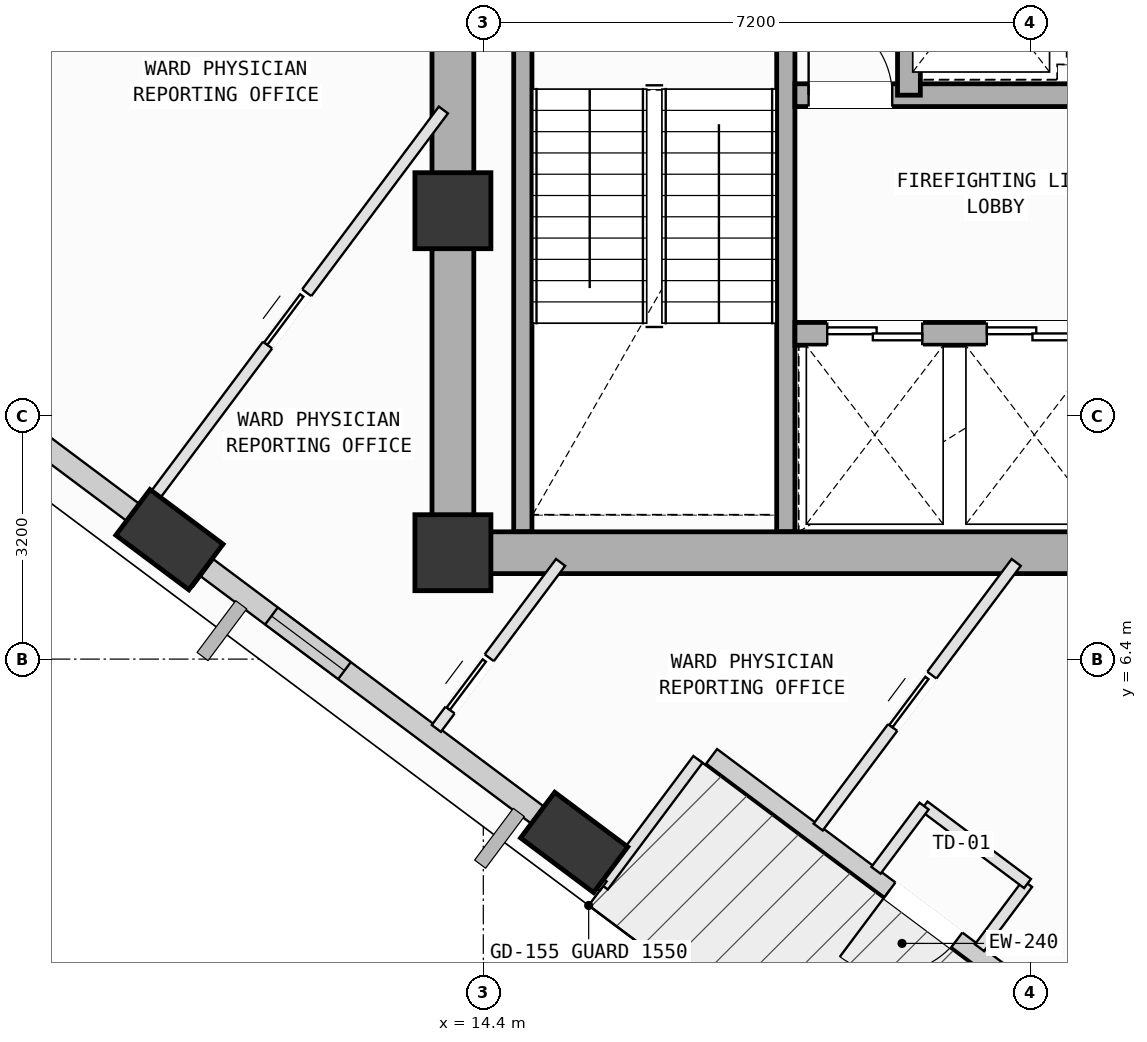
"""IFC4 building model, lengths in metres.
Left out: names, types, materials, properties, quantities, classifications, styles, units other than length and angle.
Written with IfcOpenShell. Run it as: python <this file> out.ifc"""

import sys

from ifc_helpers import new_model, si_unit, direction, frame, frame_2d, origin, origin_2d, place, context, subcontext, project, spatial, rectangle, extrude, element, fill, save


model = new_model("IFC4")
c1 = context("Model", 3, precision=1e-05, world=origin(), true_north=direction((0.0, 1.0)))
c2 = subcontext(c1, "Body", "Model", "MODEL_VIEW")
j1 = project(units=[si_unit("LENGTHUNIT", "METRE"), si_unit("PLANEANGLEUNIT", "RADIAN")], contexts=[c1])
p1 = place(None, origin())
s1 = spatial("IfcSite", under=j1, at=p1, CompositionType="ELEMENT")
p2 = place(p1, origin())
s2 = spatial("IfcBuilding", under=s1, at=p2, CompositionType="ELEMENT")
p3 = place(p2, frame((0.0, 0.0, 251.2)))
s3 = spatial("IfcBuildingStorey", under=s2, at=p3, CompositionType="ELEMENT", Elevation=251.2)
for number, where, z_axis, x_axis in (
    (1, (14.0, 7.8, 0.0), (0.0, 0.0, 1.0), (1.0, 0.0, 0.0)),
    (2, (14.0, 12.3, 0.0), (0.0, 0.0, 1.0), (1.0, 0.0, 0.0)),
):
    element("IfcColumn", number, at=place(p3, frame(where, z_axis=z_axis, x_axis=x_axis)), inside=s3, PredefinedType="COLUMN", context=c2, shape_type="SweptSolid", body=[
        extrude(rectangle(XDim=1.0, YDim=1.0, at=origin_2d()), origin(), (0.0, 0.0, 1.0), 4.0),
    ])
p4 = place(p3, frame((10.271, 7.971, 0.002), z_axis=(0.070003274171, -0.09548106893, 0.992966720027), x_axis=(-0.997462411054, 0.006244621078, 0.07092068275)))
e3 = element("IfcColumn", 3, at=p4, inside=s3, PredefinedType="COLUMN", context=c2, shape_type="SweptSolid", body=[
    extrude(rectangle(XDim=1.2, YDim=0.75, at=origin_2d()), origin(), (0.0, 0.0, 1.0), 4.025),
])
p5 = place(p3, frame((15.595, 3.988, 0.002), z_axis=(0.086372089223, -0.073443589571, 0.993552163379), x_axis=(-0.972110341337, -0.224475070802, 0.067914850025)))
e4 = element("IfcColumn", 4, at=p5, inside=s3, PredefinedType="COLUMN", context=c2, shape_type="SweptSolid", body=[
    extrude(rectangle(XDim=1.2, YDim=0.75, at=origin_2d()), origin(), (0.0, 0.0, 1.0), 4.022),
])
p6 = place(p3, frame((22.977, 0.951, 0.0), z_axis=(0.0, 0.0, 1.0), x_axis=(-0.800727631984, 0.59902859646, 0.0)))
e5 = element("IfcWall", 5, at=p6, inside=s3, PredefinedType="SOLIDWALL", context=c2, shape_type="SweptSolid", body=[
    extrude(rectangle(XDim=6.96, YDim=0.24, at=frame_2d((3.48, 0.0))), origin(), (0.0, 0.0, 1.0), 3.265),
])
p7 = place(p6, frame((2.93, 0.0, 0.0)))
e6 = element("IfcOpeningElement", 6, at=p7, cuts=e5, PredefinedType="OPENING", context=c2, shape_type="SweptSolid", body=[
    extrude(rectangle(XDim=1.1, YDim=2.15, at=frame_2d((0.55, 1.075))), frame((0.0, 0.13, 0.0), z_axis=(0.0, -1.0, 0.0), x_axis=(1.0, 0.0, 0.0)), (0.0, 0.0, 1.0), 0.26),
])
p8 = place(p3, frame((10.14, 8.069, 0.0), z_axis=(0.0, 0.0, 1.0), x_axis=(-0.800727991846, 0.599028115429, 0.0)))
e7 = element("IfcWall", 7, at=p8, inside=s3, PredefinedType="SOLIDWALL", context=c2, shape_type="SweptSolid", body=[
    extrude(rectangle(XDim=5.831, YDim=0.28, at=frame_2d((2.915, 0.0))), origin(), (0.0, 0.0, 1.0), 3.265),
])
p9 = place(p8, frame((1.917, 0.0, 0.75)))
e8 = element("IfcOpeningElement", 8, at=p9, cuts=e7, PredefinedType="OPENING", context=c2, shape_type="SweptSolid", body=[
    extrude(rectangle(XDim=1.8, YDim=2.05, at=frame_2d((0.9, 1.025))), frame((0.0, 0.15, 0.0), z_axis=(0.0, -1.0, 0.0), x_axis=(1.0, 0.0, 0.0)), (0.0, 0.0, 1.0), 0.3),
])
p10 = place(p3, frame((15.46, 4.09, 0.0), z_axis=(0.0, 0.0, 1.0), x_axis=(-0.800744184448, 0.599006469976, 0.0)))
e9 = element("IfcWall", 9, at=p10, inside=s3, PredefinedType="SOLIDWALL", context=c2, shape_type="SweptSolid", body=[
    extrude(rectangle(XDim=5.861, YDim=0.28, at=frame_2d((2.93, 0.0))), origin(), (0.0, 0.0, 1.0), 3.245),
])
p11 = place(p10, frame((3.604, 0.0, 0.75)))
e10 = element("IfcOpeningElement", 10, at=p11, cuts=e9, PredefinedType="OPENING", context=c2, shape_type="SweptSolid", body=[
    extrude(rectangle(XDim=1.2, YDim=1.75, at=frame_2d((0.6, 0.875))), frame((0.0, 0.15, 0.0), z_axis=(0.0, -1.0, 0.0), x_axis=(1.0, 0.0, 0.0)), (0.0, 0.0, 1.0), 0.3),
])
for number, where, z_axis, x_axis in (
    (11, (18.38, 15.12, 0.0), (0.0, 0.0, 1.0), (0.0, -1.0, 0.0)),
    (12, (14.92, 8.075, 0.0), (0.0, 0.0, 1.0), (0.0, 1.0, 0.0)),
):
    element("IfcWall", number, at=place(p3, frame(where, z_axis=z_axis, x_axis=x_axis)), inside=s3, PredefinedType="SOLIDWALL", context=c2, shape_type="SweptSolid", body=[
        extrude(rectangle(XDim=7.045, YDim=0.24, at=frame_2d((3.522, 0.0))), origin(), (0.0, 0.0, 1.0), 3.78),
    ])
p12 = place(p3, frame((14.0, 7.8, 0.0), z_axis=(0.0, 0.0, 1.0), x_axis=(1.0, 0.0, 0.0)))
e13 = element("IfcWall", 13, at=p12, inside=s3, PredefinedType="SHEAR", context=c2, shape_type="SweptSolid", body=[
    extrude(rectangle(XDim=10.8, YDim=0.55, at=frame_2d((5.4, 0.0))), origin(), (0.0, 0.0, 1.0), 3.78),
])
p13 = place(p3, frame((14.0, 16.8, 0.0), z_axis=(0.0, 0.0, 1.0), x_axis=(0.0, -1.0, 0.0)))
e14 = element("IfcWall", 14, at=p13, inside=s3, PredefinedType="SHEAR", context=c2, shape_type="SweptSolid", body=[
    extrude(rectangle(XDim=9.0, YDim=0.55, at=frame_2d((4.5, 0.0))), origin(), (0.0, 0.0, 1.0), 3.78),
])
p14 = place(p3, frame((18.5, 10.68, 0.0), z_axis=(0.0, 0.0, 1.0), x_axis=(1.0, 0.0, 0.0)))
e15 = element("IfcWall", 15, at=p14, inside=s3, PredefinedType="SOLIDWALL", context=c2, shape_type="SweptSolid", body=[
    extrude(rectangle(XDim=5.3, YDim=0.3, at=frame_2d((2.65, 0.0))), origin(), (0.0, 0.0, 1.0), 3.78),
])
p15 = place(p14, frame((4.22, 0.0, 0.0)))
e16 = element("IfcOpeningElement", 16, at=p15, cuts=e15, PredefinedType="OPENING", context=c2, shape_type="SweptSolid", body=[
    extrude(rectangle(XDim=0.86, YDim=2.06, at=frame_2d((0.43, 1.03))), frame((0.0, 0.16, 0.0), z_axis=(0.0, -1.0, 0.0), x_axis=(1.0, 0.0, 0.0)), (0.0, 0.0, 1.0), 0.32),
])
p16 = place(p14, frame((0.425, 0.0, 0.0)))
e17 = element("IfcOpeningElement", 17, at=p16, cuts=e15, PredefinedType="OPENING", context=c2, shape_type="SweptSolid", body=[
    extrude(rectangle(XDim=1.25, YDim=2.18, at=frame_2d((0.625, 1.09))), frame((0.0, 0.16, 0.0), z_axis=(0.0, -1.0, 0.0), x_axis=(1.0, 0.0, 0.0)), (0.0, 0.0, 1.0), 0.32),
])
p17 = place(p14, frame((2.525, 0.0, 0.0)))
e18 = element("IfcOpeningElement", 18, at=p17, cuts=e15, PredefinedType="OPENING", context=c2, shape_type="SweptSolid", body=[
    extrude(rectangle(XDim=1.25, YDim=2.18, at=frame_2d((0.625, 1.09))), frame((0.0, 0.16, 0.0), z_axis=(0.0, -1.0, 0.0), x_axis=(1.0, 0.0, 0.0)), (0.0, 0.0, 1.0), 0.32),
])
p18 = place(p3, frame((18.5, 13.82, 0.0), z_axis=(0.0, 0.0, 1.0), x_axis=(1.0, 0.0, 0.0)))
e19 = element("IfcWall", 19, at=p18, inside=s3, PredefinedType="SOLIDWALL", context=c2, shape_type="SweptSolid", body=[
    extrude(rectangle(XDim=5.3, YDim=0.3, at=frame_2d((2.65, 0.0))), origin(), (0.0, 0.0, 1.0), 3.78),
])
p19 = place(p18, frame((0.18, 0.0, 0.0)))
e20 = element("IfcOpeningElement", 20, at=p19, cuts=e19, PredefinedType="OPENING", context=c2, shape_type="SweptSolid", body=[
    extrude(rectangle(XDim=1.1, YDim=2.15, at=frame_2d((0.55, 1.075))), frame((0.0, 0.16, 0.0), z_axis=(0.0, -1.0, 0.0), x_axis=(1.0, 0.0, 0.0)), (0.0, 0.0, 1.0), 0.32),
])
p20 = place(p3, frame((20.0, 13.82, 0.0), z_axis=(0.0, 0.0, 1.0), x_axis=(0.0, 1.0, 0.0)))
e21 = element("IfcWall", 21, at=p20, inside=s3, PredefinedType="SOLIDWALL", context=c2, shape_type="SweptSolid", body=[
    extrude(rectangle(XDim=2.73, YDim=0.3, at=frame_2d((1.365, 0.0))), origin(), (0.0, 0.0, 1.0), 3.78),
])
p21 = place(p3, frame((20.928, 2.603, 0.0), z_axis=(0.0, 0.0, 1.0), x_axis=(0.599444171205, 0.800416570049, 0.0)))
e22 = element("IfcWall", 22, at=p21, inside=s3, PredefinedType="PARTITIONING", context=c2, shape_type="SweptSolid", body=[
    extrude(rectangle(XDim=1.054, YDim=0.15, at=frame_2d((0.527, 0.0))), origin(), (0.0, 0.0, 1.0), 3.78),
])
p22 = place(p3, frame((21.56, 3.447, 0.0), z_axis=(0.0, 0.0, 1.0), x_axis=(-0.800499406508, 0.599333546684, 0.0)))
e23 = element("IfcWall", 23, at=p22, inside=s3, PredefinedType="PARTITIONING", context=c2, shape_type="SweptSolid", body=[
    extrude(rectangle(XDim=1.7, YDim=0.15, at=frame_2d((0.85, 0.0))), origin(), (0.0, 0.0, 1.0), 3.415),
])
p23 = place(p3, frame((20.199, 4.466, 0.0), z_axis=(0.0, 0.0, 1.0), x_axis=(-0.599000041508, -0.800748993302, 0.0)))
e24 = element("IfcWall", 24, at=p23, inside=s3, PredefinedType="PARTITIONING", context=c2, shape_type="SweptSolid", body=[
    extrude(rectangle(XDim=1.055, YDim=0.15, at=frame_2d((0.528, 0.0))), origin(), (0.0, 0.0, 1.0), 3.78),
])
p24 = place(p3, frame((18.806, 4.19, 0.0), z_axis=(0.0, 0.0, 1.0), x_axis=(0.599020458163, 0.800733720223, 0.0)))
e25 = element("IfcWall", 25, at=p24, inside=s3, PredefinedType="PARTITIONING", context=c2, shape_type="SweptSolid", body=[
    extrude(rectangle(XDim=4.349, YDim=0.15, at=frame_2d((2.174, 0.0))), origin(), (0.0, 0.0, 1.0), 3.78),
])
p25 = place(p24, frame((1.637, 0.0, 0.0)))
e26 = element("IfcOpeningElement", 26, at=p25, cuts=e25, PredefinedType="OPENING", context=c2, shape_type="SweptSolid", body=[
    extrude(rectangle(XDim=0.86, YDim=2.06, at=frame_2d((0.43, 1.03))), frame((0.0, 0.085, 0.0), z_axis=(0.0, -1.0, 0.0), x_axis=(1.0, 0.0, 0.0)), (0.0, 0.0, 1.0), 0.17),
])
p26 = place(p3, frame((17.224, 5.08, 0.0), z_axis=(0.0, 0.0, 1.0), x_axis=(-0.59894803695, -0.800787892662, 0.0)))
e27 = element("IfcWall", 27, at=p26, inside=s3, PredefinedType="PARTITIONING", context=c2, shape_type="SweptSolid", body=[
    extrude(rectangle(XDim=2.081, YDim=0.15, at=frame_2d((1.04, 0.0))), origin(), (0.0, 0.0, 1.0), 3.78),
])
p27 = place(p3, frame((15.978, 3.414, 0.0), z_axis=(0.0, 0.0, 1.0), x_axis=(-0.800607419464, 0.599189252156, 0.0)))
e28 = element("IfcWall", 28, at=p27, inside=s3, PredefinedType="PARTITIONING", context=c2, shape_type="SweptSolid", body=[
    extrude(rectangle(XDim=0.819, YDim=0.15, at=frame_2d((0.41, 0.0))), origin(), (0.0, 0.0, 1.0), 3.245),
])
p28 = place(p3, frame((13.782, 5.488, 0.0), z_axis=(0.0, 0.0, 1.0), x_axis=(0.599283876388, 0.800536592231, 0.0)))
e29 = element("IfcWall", 29, at=p28, inside=s3, PredefinedType="PARTITIONING", context=c2, shape_type="SweptSolid", body=[
    extrude(rectangle(XDim=2.728, YDim=0.15, at=frame_2d((1.364, 0.0))), origin(), (0.0, 0.0, 1.0), 3.78),
])
p29 = place(p28, frame((0.302, 0.0, 0.0)))
e30 = element("IfcOpeningElement", 30, at=p29, cuts=e29, PredefinedType="OPENING", context=c2, shape_type="SweptSolid", body=[
    extrude(rectangle(XDim=0.86, YDim=2.06, at=frame_2d((0.43, 1.03))), frame((0.0, 0.085, 0.0), z_axis=(0.0, -1.0, 0.0), x_axis=(1.0, 0.0, 0.0)), (0.0, 0.0, 1.0), 0.17),
])
p30 = place(p3, frame((10.629, 7.416, 0.0), z_axis=(0.0, 0.0, 1.0), x_axis=(-0.8007477401, 0.599001716796, 0.0)))
e31 = element("IfcWall", 31, at=p30, inside=s3, PredefinedType="PARTITIONING", context=c2, shape_type="SweptSolid", body=[
    extrude(rectangle(XDim=0.783, YDim=0.15, at=frame_2d((0.392, 0.0))), origin(), (0.0, 0.0, 1.0), 3.245),
])
p31 = place(p3, frame((9.939, 8.363, 0.0), z_axis=(0.0, 0.0, 1.0), x_axis=(0.598983005593, 0.80076173673, 0.0)))
e32 = element("IfcWall", 32, at=p31, inside=s3, PredefinedType="PARTITIONING", context=c2, shape_type="SweptSolid", body=[
    extrude(rectangle(XDim=6.571, YDim=0.15, at=frame_2d((3.286, 0.0))), origin(), (0.0, 0.0, 1.0), 3.78),
])
p32 = place(p31, frame((2.709, 0.0, 0.0)))
e33 = element("IfcOpeningElement", 33, at=p32, cuts=e32, PredefinedType="OPENING", context=c2, shape_type="SweptSolid", body=[
    extrude(rectangle(XDim=0.86, YDim=2.06, at=frame_2d((0.43, 1.03))), frame((0.0, 0.085, 0.0), z_axis=(0.0, -1.0, 0.0), x_axis=(1.0, 0.0, 0.0)), (0.0, 0.0, 1.0), 0.17),
])
p33 = place(p3, frame((6.096, 11.238, 0.0), z_axis=(0.0, 0.0, 1.0), x_axis=(0.598991058124, 0.80075571324, 0.0)))
e34 = element("IfcWall", 34, at=p33, inside=s3, PredefinedType="PARTITIONING", context=c2, shape_type="SweptSolid", body=[
    extrude(rectangle(XDim=13.635, YDim=0.15, at=frame_2d((6.817, 0.0))), origin(), (0.0, 0.0, 1.0), 3.78),
])
p34 = place(p7, origin())
e35 = element("IfcDoor", 35, at=p34, inside=s3, OperationType="SINGLE_SWING_RIGHT", PredefinedType="DOOR", context=c2, shape_type="SweptSolid", body=[
    extrude(rectangle(XDim=1.1, YDim=2.15, at=frame_2d((0.55, 1.075))), frame((0.0, 0.025, 0.0), z_axis=(0.0, -1.0, 0.0), x_axis=(1.0, 0.0, 0.0)), (0.0, 0.0, 1.0), 0.05),
])
fill(e6, e35)
p35 = place(p11, origin())
e36 = element("IfcWindow", 36, at=p35, inside=s3, PartitioningType="SINGLE_PANEL", PredefinedType="WINDOW", context=c2, shape_type="SweptSolid", body=[
    extrude(rectangle(XDim=1.2, YDim=1.75, at=frame_2d((0.6, 0.875))), frame((0.0, 0.03, 0.0), z_axis=(0.0, -1.0, 0.0), x_axis=(1.0, 0.0, 0.0)), (0.0, 0.0, 1.0), 0.06),
])
fill(e10, e36)
p36 = place(p19, origin())
e37 = element("IfcDoor", 37, at=p36, inside=s3, OperationType="SINGLE_SWING_LEFT", PredefinedType="DOOR", context=c2, shape_type="SweptSolid", body=[
    extrude(rectangle(XDim=1.1, YDim=2.15, at=frame_2d((0.55, 1.075))), frame((0.0, 0.025, 0.0), z_axis=(0.0, -1.0, 0.0), x_axis=(1.0, 0.0, 0.0)), (0.0, 0.0, 1.0), 0.05),
])
fill(e20, e37)
p37 = place(p16, origin())
e38 = element("IfcDoor", 38, at=p37, inside=s3, OperationType="DOUBLE_DOOR_SLIDING", PredefinedType="DOOR", context=c2, shape_type="SweptSolid", body=[
    extrude(rectangle(XDim=1.25, YDim=2.18, at=frame_2d((0.625, 1.09))), frame((0.0, 0.025, 0.0), z_axis=(0.0, -1.0, 0.0), x_axis=(1.0, 0.0, 0.0)), (0.0, 0.0, 1.0), 0.05),
])
fill(e17, e38)
p38 = place(p17, origin())
e39 = element("IfcDoor", 39, at=p38, inside=s3, OperationType="DOUBLE_DOOR_SLIDING", PredefinedType="DOOR", context=c2, shape_type="SweptSolid", body=[
    extrude(rectangle(XDim=1.25, YDim=2.18, at=frame_2d((0.625, 1.09))), frame((0.0, 0.025, 0.0), z_axis=(0.0, -1.0, 0.0), x_axis=(1.0, 0.0, 0.0)), (0.0, 0.0, 1.0), 0.05),
])
fill(e18, e39)
p39 = place(p32, origin())
e40 = element("IfcDoor", 40, at=p39, inside=s3, OperationType="SLIDING_TO_LEFT", PredefinedType="DOOR", context=c2, shape_type="SweptSolid", body=[
    extrude(rectangle(XDim=0.86, YDim=2.06, at=frame_2d((0.43, 1.03))), frame((0.0, 0.025, 0.0), z_axis=(0.0, -1.0, 0.0), x_axis=(1.0, 0.0, 0.0)), (0.0, 0.0, 1.0), 0.05),
])
fill(e33, e40)
p40 = place(p29, origin())
e41 = element("IfcDoor", 41, at=p40, inside=s3, OperationType="SLIDING_TO_LEFT", PredefinedType="DOOR", context=c2, shape_type="SweptSolid", body=[
    extrude(rectangle(XDim=0.86, YDim=2.06, at=frame_2d((0.43, 1.03))), frame((0.0, 0.025, 0.0), z_axis=(0.0, -1.0, 0.0), x_axis=(1.0, 0.0, 0.0)), (0.0, 0.0, 1.0), 0.05),
])
fill(e30, e41)
p41 = place(p25, origin())
e42 = element("IfcDoor", 42, at=p41, inside=s3, OperationType="SLIDING_TO_LEFT", PredefinedType="DOOR", context=c2, shape_type="SweptSolid", body=[
    extrude(rectangle(XDim=0.86, YDim=2.06, at=frame_2d((0.43, 1.03))), frame((0.0, 0.025, 0.0), z_axis=(0.0, -1.0, 0.0), x_axis=(1.0, 0.0, 0.0)), (0.0, 0.0, 1.0), 0.05),
])
fill(e26, e42)
save(model, sys.argv[1])
